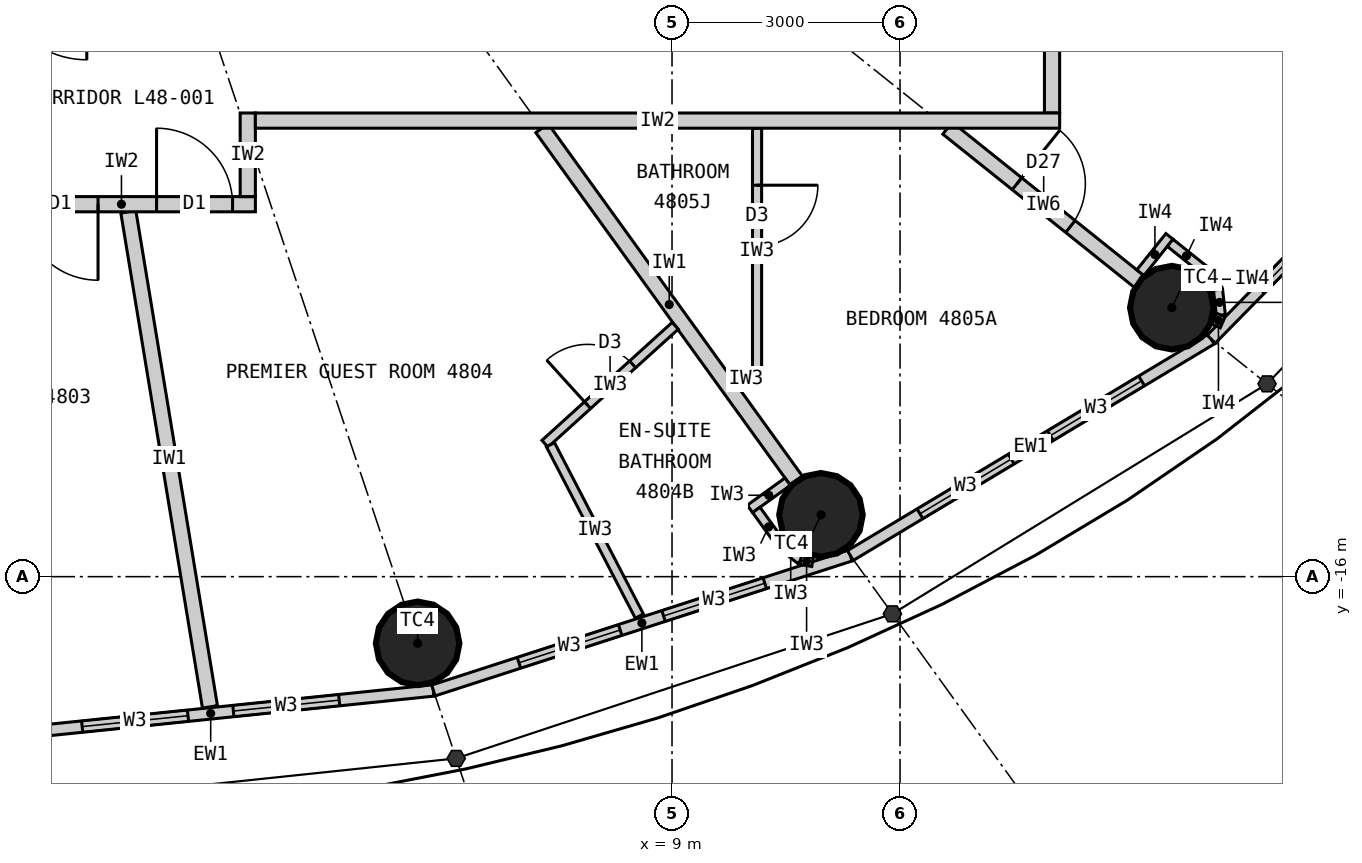
"""IFC4 building model, lengths in metres.
Left out: names, types, materials, properties, quantities, classifications, styles, units other than length and angle.
Written with IfcOpenShell. Run it as: python <this file> out.ifc"""

import sys

from ifc_helpers import new_model, si_unit, direction, frame, frame_2d, origin, origin_2d, place, context, subcontext, project, spatial, rectangle, circle, extrude, element, fill, save


model = new_model("IFC4")
c1 = context("Model", 3, precision=1e-05, world=origin(), true_north=direction((0.0, 1.0)))
c2 = subcontext(c1, "Body", "Model", "MODEL_VIEW")
j1 = project(units=[si_unit("LENGTHUNIT", "METRE"), si_unit("PLANEANGLEUNIT", "RADIAN")], contexts=[c1])
p1 = place(None, origin())
s1 = spatial("IfcSite", under=j1, at=p1, CompositionType="ELEMENT")
p2 = place(p1, origin())
s2 = spatial("IfcBuilding", under=s1, at=p2, CompositionType="ELEMENT")
p3 = place(p2, frame((0.0, 0.0, 179.7)))
s3 = spatial("IfcBuildingStorey", under=s2, at=p3, CompositionType="ELEMENT", Elevation=179.7)
for number, where, z_axis, x_axis in (
    (1, (5.653, -16.877, 0.0), (0.0, 0.0, 1.0), (1.0, 0.0, 0.0)),
    (2, (10.96, -15.186, 0.0), (0.0, 0.0, 1.0), (1.0, 0.0, 0.0)),
    (3, (15.576, -12.461, 0.0), (0.0, 0.0, 1.0), (1.0, 0.0, 0.0)),
):
    element("IfcColumn", number, at=place(p3, frame(where, z_axis=z_axis, x_axis=x_axis)), inside=s3, PredefinedType="COLUMN", context=c2, shape_type="SweptSolid", body=[
        extrude(circle(Radius=0.55, at=origin_2d()), origin(), (0.0, 0.0, 1.0), 3.3),
    ])
p4 = place(p3, frame((0.0, -18.1, 0.0), z_axis=(0.0, 0.0, 1.0), x_axis=(0.994751738032, 0.102318032045, 0.0)))
e4 = element("IfcWall", 4, at=p4, inside=s3, PredefinedType="ELEMENTEDWALL", context=c2, shape_type="SweptSolid", body=[
    extrude(rectangle(XDim=5.891, YDim=0.15, at=frame_2d((2.946, 0.0))), origin(), (0.0, 0.0, 1.0), 3.12),
])
p5 = place(p4, frame((1.246, 0.0, 0.9)))
e5 = element("IfcOpeningElement", 5, at=p5, cuts=e4, PredefinedType="OPENING", context=c2, shape_type="SweptSolid", body=[
    extrude(rectangle(XDim=1.4, YDim=1.9, at=frame_2d((0.7, 0.95))), frame((0.0, 0.085, 0.0), z_axis=(0.0, -1.0, 0.0), x_axis=(1.0, 0.0, 0.0)), (0.0, 0.0, 1.0), 0.17),
])
p6 = place(p4, frame((3.246, 0.0, 0.9)))
e6 = element("IfcOpeningElement", 6, at=p6, cuts=e4, PredefinedType="OPENING", context=c2, shape_type="SweptSolid", body=[
    extrude(rectangle(XDim=1.4, YDim=1.9, at=frame_2d((0.7, 0.95))), frame((0.0, 0.085, 0.0), z_axis=(0.0, -1.0, 0.0), x_axis=(1.0, 0.0, 0.0)), (0.0, 0.0, 1.0), 0.17),
])
p7 = place(p3, frame((5.86, -17.497, 0.0), z_axis=(0.0, 0.0, 1.0), x_axis=(0.951432482129, 0.307857486429, 0.0)))
e7 = element("IfcWall", 7, at=p7, inside=s3, PredefinedType="ELEMENTEDWALL", context=c2, shape_type="SweptSolid", body=[
    extrude(rectangle(XDim=5.766, YDim=0.15, at=frame_2d((2.883, 0.0))), origin(), (0.0, 0.0, 1.0), 3.12),
])
p8 = place(p7, frame((1.183, 0.0, 0.9)))
e8 = element("IfcOpeningElement", 8, at=p8, cuts=e7, PredefinedType="OPENING", context=c2, shape_type="SweptSolid", body=[
    extrude(rectangle(XDim=1.4, YDim=1.9, at=frame_2d((0.7, 0.95))), frame((0.0, 0.085, 0.0), z_axis=(0.0, -1.0, 0.0), x_axis=(1.0, 0.0, 0.0)), (0.0, 0.0, 1.0), 0.17),
])
p9 = place(p7, frame((3.183, 0.0, 0.9)))
e9 = element("IfcOpeningElement", 9, at=p9, cuts=e7, PredefinedType="OPENING", context=c2, shape_type="SweptSolid", body=[
    extrude(rectangle(XDim=1.4, YDim=1.9, at=frame_2d((0.7, 0.95))), frame((0.0, 0.085, 0.0), z_axis=(0.0, -1.0, 0.0), x_axis=(1.0, 0.0, 0.0)), (0.0, 0.0, 1.0), 0.17),
])
p10 = place(p3, frame((11.346, -15.722, 0.0), z_axis=(0.0, 0.0, 1.0), x_axis=(0.857695199231, 0.514158482587, 0.0)))
e10 = element("IfcWall", 10, at=p10, inside=s3, PredefinedType="ELEMENTEDWALL", context=c2, shape_type="SweptSolid", body=[
    extrude(rectangle(XDim=5.536, YDim=0.15, at=frame_2d((2.768, 0.0))), origin(), (0.0, 0.0, 1.0), 3.12),
])
p11 = place(p10, frame((1.068, 0.0, 0.9)))
e11 = element("IfcOpeningElement", 11, at=p11, cuts=e10, PredefinedType="OPENING", context=c2, shape_type="SweptSolid", body=[
    extrude(rectangle(XDim=1.4, YDim=1.9, at=frame_2d((0.7, 0.95))), frame((0.0, 0.085, 0.0), z_axis=(0.0, -1.0, 0.0), x_axis=(1.0, 0.0, 0.0)), (0.0, 0.0, 1.0), 0.17),
])
p12 = place(p10, frame((3.068, 0.0, 0.9)))
e12 = element("IfcOpeningElement", 12, at=p12, cuts=e10, PredefinedType="OPENING", context=c2, shape_type="SweptSolid", body=[
    extrude(rectangle(XDim=1.4, YDim=1.9, at=frame_2d((0.7, 0.95))), frame((0.0, 0.085, 0.0), z_axis=(0.0, -1.0, 0.0), x_axis=(1.0, 0.0, 0.0)), (0.0, 0.0, 1.0), 0.17),
])
p13 = place(p3, frame((16.095, -12.876, 0.0), z_axis=(0.0, 0.0, 1.0), x_axis=(0.700727467776, 0.71342905457, 0.0)))
e13 = element("IfcWall", 13, at=p13, inside=s3, PredefinedType="ELEMENTEDWALL", context=c2, shape_type="SweptSolid", body=[
    extrude(rectangle(XDim=5.247, YDim=0.15, at=frame_2d((2.624, 0.0))), origin(), (0.0, 0.0, 1.0), 3.12),
])
p14 = place(p13, frame((0.924, 0.0, 0.9)))
e14 = element("IfcOpeningElement", 14, at=p14, cuts=e13, PredefinedType="OPENING", context=c2, shape_type="SweptSolid", body=[
    extrude(rectangle(XDim=1.4, YDim=1.9, at=frame_2d((0.7, 0.95))), frame((0.0, 0.085, 0.0), z_axis=(0.0, -1.0, 0.0), x_axis=(1.0, 0.0, 0.0)), (0.0, 0.0, 1.0), 0.17),
])
p15 = place(p13, frame((2.924, 0.0, 0.9)))
e15 = element("IfcOpeningElement", 15, at=p15, cuts=e13, PredefinedType="OPENING", context=c2, shape_type="SweptSolid", body=[
    extrude(rectangle(XDim=1.4, YDim=1.9, at=frame_2d((0.7, 0.95))), frame((0.0, 0.085, 0.0), z_axis=(0.0, -1.0, 0.0), x_axis=(1.0, 0.0, 0.0)), (0.0, 0.0, 1.0), 0.17),
])
p16 = place(p3, frame((14.0, -9.9, 0.0), z_axis=(0.0, 0.0, 1.0), x_axis=(0.0, 1.0, 0.0)))
e16 = element("IfcWall", 16, at=p16, inside=s3, PredefinedType="PARTITIONING", context=c2, shape_type="SweptSolid", body=[
    extrude(rectangle(XDim=19.8, YDim=0.2, at=frame_2d((9.9, 0.0))), origin(), (0.0, 0.0, 1.0), 3.12),
])
p17 = place(p16, frame((4.268, 0.0, 0.0)))
e17 = element("IfcOpeningElement", 17, at=p17, cuts=e16, PredefinedType="OPENING", context=c2, shape_type="SweptSolid", body=[
    extrude(rectangle(XDim=1.0, YDim=2.2, at=frame_2d((0.5, 1.1))), frame((0.0, 0.11, 0.0), z_axis=(0.0, -1.0, 0.0), x_axis=(1.0, 0.0, 0.0)), (0.0, 0.0, 1.0), 0.22),
])
p18 = place(p16, frame((7.177, 0.0, 0.0)))
e18 = element("IfcOpeningElement", 18, at=p18, cuts=e16, PredefinedType="OPENING", context=c2, shape_type="SweptSolid", body=[
    extrude(rectangle(XDim=1.0, YDim=2.2, at=frame_2d((0.5, 1.1))), frame((0.0, 0.11, 0.0), z_axis=(0.0, -1.0, 0.0), x_axis=(1.0, 0.0, 0.0)), (0.0, 0.0, 1.0), 0.22),
])
p19 = place(p16, frame((17.701, 0.0, 0.0)))
e19 = element("IfcOpeningElement", 19, at=p19, cuts=e16, PredefinedType="OPENING", context=c2, shape_type="SweptSolid", body=[
    extrude(rectangle(XDim=1.0, YDim=2.2, at=frame_2d((0.5, 1.1))), frame((0.0, 0.11, 0.0), z_axis=(0.0, -1.0, 0.0), x_axis=(1.0, 0.0, 0.0)), (0.0, 0.0, 1.0), 0.22),
])
p20 = place(p3, frame((1.847, -11.2, 0.0), z_axis=(0.0, 0.0, 1.0), x_axis=(0.162695449404, -0.986676335352, 0.0)))
e20 = element("IfcWall", 20, at=p20, inside=s3, PredefinedType="PARTITIONING", context=c2, shape_type="SweptSolid", body=[
    extrude(rectangle(XDim=6.601, YDim=0.2, at=frame_2d((3.301, 0.0))), origin(), (0.0, 0.0, 1.0), 3.12),
])
p21 = place(p3, frame((7.289, -10.1, 0.0), z_axis=(0.0, 0.0, 1.0), x_axis=(0.585222595178, -0.810872686735, 0.0)))
e21 = element("IfcWall", 21, at=p21, inside=s3, PredefinedType="PARTITIONING", context=c2, shape_type="SweptSolid", body=[
    extrude(rectangle(XDim=5.722, YDim=0.2, at=frame_2d((2.861, 0.0))), origin(), (0.0, 0.0, 1.0), 2.27),
])
p22 = place(p3, frame((12.625, -10.1, 0.0), z_axis=(0.0, 0.0, 1.0), x_axis=(0.780876185034, -0.624685827954, 0.0)))
e22 = element("IfcWall", 22, at=p22, inside=s3, PredefinedType="PARTITIONING", context=c2, shape_type="SweptSolid", body=[
    extrude(rectangle(XDim=3.229, YDim=0.2, at=frame_2d((1.615, 0.0))), origin(), (0.0, 0.0, 1.0), 2.27),
])
p23 = place(p22, frame((1.17, 0.0, 0.0)))
e23 = element("IfcOpeningElement", 23, at=p23, cuts=e22, PredefinedType="OPENING", context=c2, shape_type="SweptSolid", body=[
    extrude(rectangle(XDim=0.9, YDim=2.1, at=frame_2d((0.45, 1.05))), frame((0.0, 0.11, 0.0), z_axis=(0.0, -1.0, 0.0), x_axis=(1.0, 0.0, 0.0)), (0.0, 0.0, 1.0), 0.22),
])
p24 = place(p3, frame((3.518, -11.1, 0.0), z_axis=(0.0, 0.0, 1.0), x_axis=(-1.0, 0.0, 0.0)))
e24 = element("IfcWall", 24, at=p24, inside=s3, PredefinedType="PARTITIONING", context=c2, shape_type="SweptSolid", body=[
    extrude(rectangle(XDim=3.524, YDim=0.2, at=frame_2d((1.762, 0.0))), origin(), (0.0, 0.0, 1.0), 3.12),
])
p25 = place(p24, frame((2.07, 0.0, 0.0)))
e25 = element("IfcOpeningElement", 25, at=p25, cuts=e24, PredefinedType="OPENING", context=c2, shape_type="SweptSolid", body=[
    extrude(rectangle(XDim=1.0, YDim=2.2, at=frame_2d((0.5, 1.1))), frame((0.0, 0.11, 0.0), z_axis=(0.0, -1.0, 0.0), x_axis=(1.0, 0.0, 0.0)), (0.0, 0.0, 1.0), 0.22),
])
p26 = place(p24, frame((0.3, 0.0, 0.0)))
e26 = element("IfcOpeningElement", 26, at=p26, cuts=e24, PredefinedType="OPENING", context=c2, shape_type="SweptSolid", body=[
    extrude(rectangle(XDim=1.0, YDim=2.2, at=frame_2d((0.5, 1.1))), frame((0.0, 0.11, 0.0), z_axis=(0.0, -1.0, 0.0), x_axis=(1.0, 0.0, 0.0)), (0.0, 0.0, 1.0), 0.22),
])
p27 = place(p3, frame((3.418, -9.9, 0.0), z_axis=(0.0, 0.0, 1.0), x_axis=(0.0, -1.0, 0.0)))
e27 = element("IfcWall", 27, at=p27, inside=s3, PredefinedType="PARTITIONING", context=c2, shape_type="SweptSolid", body=[
    extrude(rectangle(XDim=1.1, YDim=0.2, at=frame_2d((0.55, 0.0))), origin(), (0.0, 0.0, 1.0), 3.12),
])
p28 = place(p3, frame((9.042, -12.699, 0.0), z_axis=(0.0, 0.0, 1.0), x_axis=(-0.741100257539, -0.671394376112, 0.0)))
e28 = element("IfcWall", 28, at=p28, inside=s3, PredefinedType="PARTITIONING", context=c2, shape_type="SweptSolid", body=[
    extrude(rectangle(XDim=2.312, YDim=0.12, at=frame_2d((1.156, 0.0))), origin(), (0.0, 0.0, 1.0), 3.12),
])
p29 = place(p28, frame((0.756, 0.0, 0.0)))
e29 = element("IfcOpeningElement", 29, at=p29, cuts=e28, PredefinedType="OPENING", context=c2, shape_type="SweptSolid", body=[
    extrude(rectangle(XDim=0.8, YDim=2.1, at=frame_2d((0.4, 1.05))), frame((0.0, 0.07, 0.0), z_axis=(0.0, -1.0, 0.0), x_axis=(1.0, 0.0, 0.0)), (0.0, 0.0, 1.0), 0.14),
])
p30 = place(p3, frame((7.401, -14.264, 0.0), z_axis=(0.0, 0.0, 1.0), x_axis=(0.460505131319, -0.887657041897, 0.0)))
e30 = element("IfcWall", 30, at=p30, inside=s3, PredefinedType="PARTITIONING", context=c2, shape_type="SweptSolid", body=[
    extrude(rectangle(XDim=2.54, YDim=0.12, at=frame_2d((1.27, 0.0))), origin(), (0.0, 0.0, 1.0), 3.12),
])
p31 = place(p3, frame((10.522, -14.75, 0.0), z_axis=(0.0, 0.0, 1.0), x_axis=(-0.811057588427, -0.584966313777, 0.0)))
e31 = element("IfcWall", 31, at=p31, inside=s3, PredefinedType="PARTITIONING", context=c2, shape_type="SweptSolid", body=[
    extrude(rectangle(XDim=0.612, YDim=0.12, at=frame_2d((0.306, 0.0))), origin(), (0.0, 0.0, 1.0), 3.12),
])
p32 = place(p3, frame((10.109, -15.122, 0.0), z_axis=(0.0, 0.0, 1.0), x_axis=(0.585344718358, -0.810784534072, 0.0)))
e32 = element("IfcWall", 32, at=p32, inside=s3, PredefinedType="PARTITIONING", context=c2, shape_type="SweptSolid", body=[
    extrude(rectangle(XDim=0.55, YDim=0.12, at=frame_2d((0.275, 0.0))), origin(), (0.0, 0.0, 1.0), 3.12),
])
p33 = place(p3, frame((10.431, -15.568, 0.0), z_axis=(0.0, 0.0, 1.0), x_axis=(0.77505137267, -0.631898227345, 0.0)))
e33 = element("IfcWall", 33, at=p33, inside=s3, PredefinedType="PARTITIONING", context=c2, shape_type="SweptSolid", body=[
    extrude(rectangle(XDim=0.338, YDim=0.12, at=frame_2d((0.169, 0.0))), origin(), (0.0, 0.0, 1.0), 3.12),
])
p34 = place(p3, frame((10.693, -15.781, 0.0), z_axis=(0.0, 0.0, 1.0), x_axis=(0.987256785332, -0.159135287777, 0.0)))
e34 = element("IfcWall", 34, at=p34, inside=s3, PredefinedType="PARTITIONING", context=c2, shape_type="SweptSolid", body=[
    extrude(rectangle(XDim=0.158, YDim=0.12, at=frame_2d((0.079, 0.0))), origin(), (0.0, 0.0, 1.0), 3.12),
])
p35 = place(p3, frame((9.771, -13.4, 0.0), z_axis=(0.0, 0.0, 1.0), x_axis=(1.0, 0.0, 0.0)))
e35 = element("IfcWall", 35, at=p35, inside=s3, PredefinedType="PARTITIONING", context=c2, shape_type="SweptSolid", body=[
    extrude(rectangle(XDim=0.408, YDim=0.12, at=frame_2d((0.204, 0.0))), origin(), (0.0, 0.0, 1.0), 3.12),
])
p36 = place(p3, frame((10.119, -10.1, 0.0), z_axis=(0.0, 0.0, 1.0), x_axis=(0.0, -1.0, 0.0)))
e36 = element("IfcWall", 36, at=p36, inside=s3, PredefinedType="PARTITIONING", context=c2, shape_type="SweptSolid", body=[
    extrude(rectangle(XDim=3.24, YDim=0.12, at=frame_2d((1.62, 0.0))), origin(), (0.0, 0.0, 1.0), 3.12),
])
p37 = place(p36, frame((0.75, 0.0, 0.0)))
e37 = element("IfcOpeningElement", 37, at=p37, cuts=e36, PredefinedType="OPENING", context=c2, shape_type="SweptSolid", body=[
    extrude(rectangle(XDim=0.8, YDim=2.1, at=frame_2d((0.4, 1.05))), frame((0.0, 0.07, 0.0), z_axis=(0.0, -1.0, 0.0), x_axis=(1.0, 0.0, 0.0)), (0.0, 0.0, 1.0), 0.14),
])
p38 = place(p3, frame((14.1, -10.0, 0.0), z_axis=(0.0, 0.0, 1.0), x_axis=(-1.0, 0.0, 0.0)))
e38 = element("IfcWall", 38, at=p38, inside=s3, PredefinedType="PARTITIONING", context=c2, shape_type="SweptSolid", body=[
    extrude(rectangle(XDim=10.582, YDim=0.2, at=frame_2d((5.291, 0.0))), origin(), (0.0, 0.0, 1.0), 3.12),
])
p39 = place(p3, frame((15.162, -12.002, 0.0), z_axis=(0.0, 0.0, 1.0), x_axis=(0.624597762427, 0.780946627607, 0.0)))
e39 = element("IfcWall", 39, at=p39, inside=s3, PredefinedType="PARTITIONING", context=c2, shape_type="SweptSolid", body=[
    extrude(rectangle(XDim=0.612, YDim=0.12, at=frame_2d((0.306, 0.0))), origin(), (0.0, 0.0, 1.0), 3.12),
])
p40 = place(p3, frame((15.554, -11.608, 0.0), z_axis=(0.0, 0.0, 1.0), x_axis=(0.780695577787, -0.624911525597, 0.0)))
e40 = element("IfcWall", 40, at=p40, inside=s3, PredefinedType="PARTITIONING", context=c2, shape_type="SweptSolid", body=[
    extrude(rectangle(XDim=0.55, YDim=0.12, at=frame_2d((0.275, 0.0))), origin(), (0.0, 0.0, 1.0), 3.12),
])
p41 = place(p3, frame((15.984, -11.952, 0.0), z_axis=(0.0, 0.0, 1.0), x_axis=(0.592335221171, -0.805691619517, 0.0)))
e41 = element("IfcWall", 41, at=p41, inside=s3, PredefinedType="PARTITIONING", context=c2, shape_type="SweptSolid", body=[
    extrude(rectangle(XDim=0.338, YDim=0.12, at=frame_2d((0.169, 0.0))), origin(), (0.0, 0.0, 1.0), 3.12),
])
p42 = place(p3, frame((16.184, -12.224, 0.0), z_axis=(0.0, 0.0, 1.0), x_axis=(0.110669692975, -0.993857242795, 0.0)))
e42 = element("IfcWall", 42, at=p42, inside=s3, PredefinedType="PARTITIONING", context=c2, shape_type="SweptSolid", body=[
    extrude(rectangle(XDim=0.337, YDim=0.12, at=frame_2d((0.169, 0.0))), origin(), (0.0, 0.0, 1.0), 3.12),
])
p43 = place(p3, frame((16.221, -12.559, 0.0), z_axis=(0.0, 0.0, 1.0), x_axis=(-0.401064416249, -0.916049853457, 0.0)))
e43 = element("IfcWall", 43, at=p43, inside=s3, PredefinedType="PARTITIONING", context=c2, shape_type="SweptSolid", body=[
    extrude(rectangle(XDim=0.156, YDim=0.12, at=frame_2d((0.078, 0.0))), origin(), (0.0, 0.0, 1.0), 3.12),
])
p44 = place(p5, origin())
e44 = element("IfcWindow", 44, at=p44, inside=s3, PartitioningType="SINGLE_PANEL", PredefinedType="WINDOW", context=c2, shape_type="SweptSolid", body=[
    extrude(rectangle(XDim=1.4, YDim=1.9, at=frame_2d((0.7, 0.95))), frame((0.0, 0.03, 0.0), z_axis=(0.0, -1.0, 0.0), x_axis=(1.0, 0.0, 0.0)), (0.0, 0.0, 1.0), 0.06),
])
fill(e5, e44)
p45 = place(p6, origin())
e45 = element("IfcWindow", 45, at=p45, inside=s3, PartitioningType="SINGLE_PANEL", PredefinedType="WINDOW", context=c2, shape_type="SweptSolid", body=[
    extrude(rectangle(XDim=1.4, YDim=1.9, at=frame_2d((0.7, 0.95))), frame((0.0, 0.03, 0.0), z_axis=(0.0, -1.0, 0.0), x_axis=(1.0, 0.0, 0.0)), (0.0, 0.0, 1.0), 0.06),
])
fill(e6, e45)
p46 = place(p8, origin())
e46 = element("IfcWindow", 46, at=p46, inside=s3, PartitioningType="SINGLE_PANEL", PredefinedType="WINDOW", context=c2, shape_type="SweptSolid", body=[
    extrude(rectangle(XDim=1.4, YDim=1.9, at=frame_2d((0.7, 0.95))), frame((0.0, 0.03, 0.0), z_axis=(0.0, -1.0, 0.0), x_axis=(1.0, 0.0, 0.0)), (0.0, 0.0, 1.0), 0.06),
])
fill(e8, e46)
p47 = place(p9, origin())
e47 = element("IfcWindow", 47, at=p47, inside=s3, PartitioningType="SINGLE_PANEL", PredefinedType="WINDOW", context=c2, shape_type="SweptSolid", body=[
    extrude(rectangle(XDim=1.4, YDim=1.9, at=frame_2d((0.7, 0.95))), frame((0.0, 0.03, 0.0), z_axis=(0.0, -1.0, 0.0), x_axis=(1.0, 0.0, 0.0)), (0.0, 0.0, 1.0), 0.06),
])
fill(e9, e47)
p48 = place(p11, origin())
e48 = element("IfcWindow", 48, at=p48, inside=s3, PartitioningType="SINGLE_PANEL", PredefinedType="WINDOW", context=c2, shape_type="SweptSolid", body=[
    extrude(rectangle(XDim=1.4, YDim=1.9, at=frame_2d((0.7, 0.95))), frame((0.0, 0.03, 0.0), z_axis=(0.0, -1.0, 0.0), x_axis=(1.0, 0.0, 0.0)), (0.0, 0.0, 1.0), 0.06),
])
fill(e11, e48)
p49 = place(p12, origin())
e49 = element("IfcWindow", 49, at=p49, inside=s3, PartitioningType="SINGLE_PANEL", PredefinedType="WINDOW", context=c2, shape_type="SweptSolid", body=[
    extrude(rectangle(XDim=1.4, YDim=1.9, at=frame_2d((0.7, 0.95))), frame((0.0, 0.03, 0.0), z_axis=(0.0, -1.0, 0.0), x_axis=(1.0, 0.0, 0.0)), (0.0, 0.0, 1.0), 0.06),
])
fill(e12, e49)
p50 = place(p14, origin())
e50 = element("IfcWindow", 50, at=p50, inside=s3, PartitioningType="SINGLE_PANEL", PredefinedType="WINDOW", context=c2, shape_type="SweptSolid", body=[
    extrude(rectangle(XDim=1.4, YDim=1.9, at=frame_2d((0.7, 0.95))), frame((0.0, 0.03, 0.0), z_axis=(0.0, -1.0, 0.0), x_axis=(1.0, 0.0, 0.0)), (0.0, 0.0, 1.0), 0.06),
])
fill(e14, e50)
p51 = place(p25, origin())
e51 = element("IfcDoor", 51, at=p51, inside=s3, OperationType="SINGLE_SWING_LEFT", PredefinedType="DOOR", context=c2, shape_type="SweptSolid", body=[
    extrude(rectangle(XDim=1.0, YDim=2.2, at=frame_2d((0.5, 1.1))), frame((0.0, 0.025, 0.0), z_axis=(0.0, -1.0, 0.0), x_axis=(1.0, 0.0, 0.0)), (0.0, 0.0, 1.0), 0.05),
])
fill(e25, e51)
p52 = place(p29, origin())
e52 = element("IfcDoor", 52, at=p52, inside=s3, OperationType="SINGLE_SWING_RIGHT", PredefinedType="DOOR", context=c2, shape_type="SweptSolid", body=[
    extrude(rectangle(XDim=0.8, YDim=2.1, at=frame_2d((0.4, 1.05))), frame((0.0, 0.025, 0.0), z_axis=(0.0, -1.0, 0.0), x_axis=(1.0, 0.0, 0.0)), (0.0, 0.0, 1.0), 0.05),
])
fill(e29, e52)
p53 = place(p26, origin())
e53 = element("IfcDoor", 53, at=p53, inside=s3, OperationType="SINGLE_SWING_RIGHT", PredefinedType="DOOR", context=c2, shape_type="SweptSolid", body=[
    extrude(rectangle(XDim=1.0, YDim=2.2, at=frame_2d((0.5, 1.1))), frame((0.0, 0.025, 0.0), z_axis=(0.0, -1.0, 0.0), x_axis=(1.0, 0.0, 0.0)), (0.0, 0.0, 1.0), 0.05),
])
fill(e26, e53)
p54 = place(p37, origin())
e54 = element("IfcDoor", 54, at=p54, inside=s3, OperationType="SINGLE_SWING_LEFT", PredefinedType="DOOR", context=c2, shape_type="SweptSolid", body=[
    extrude(rectangle(XDim=0.8, YDim=2.1, at=frame_2d((0.4, 1.05))), frame((0.0, 0.025, 0.0), z_axis=(0.0, -1.0, 0.0), x_axis=(1.0, 0.0, 0.0)), (0.0, 0.0, 1.0), 0.05),
])
fill(e37, e54)
p55 = place(p23, origin())
e55 = element("IfcDoor", 55, at=p55, inside=s3, OperationType="SINGLE_SWING_LEFT", PredefinedType="DOOR", context=c2, shape_type="SweptSolid", body=[
    extrude(rectangle(XDim=0.9, YDim=2.1, at=frame_2d((0.45, 1.05))), frame((0.0, 0.025, 0.0), z_axis=(0.0, -1.0, 0.0), x_axis=(1.0, 0.0, 0.0)), (0.0, 0.0, 1.0), 0.05),
])
fill(e23, e55)
save(model, sys.argv[1])
